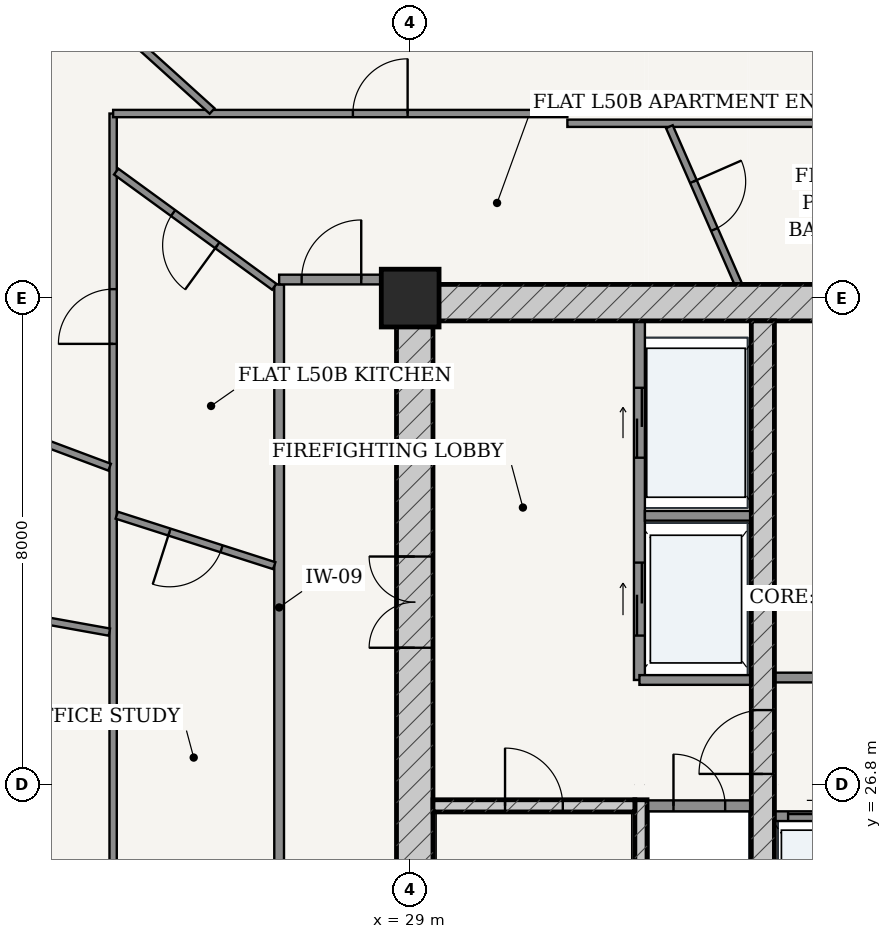
"""IFC4 building model, lengths in metres.
Left out: names, types, materials, properties, quantities, classifications, styles, units other than length and angle.
Written with IfcOpenShell. Run it as: python <this file> out.ifc"""

import sys

from ifc_helpers import new_model, si_unit, direction, frame, frame_2d, origin, origin_2d, place, context, subcontext, project, spatial, rectangle, extrude, source, transform, mapped, element, fill, save


model = new_model("IFC4")
c1 = context("Model", 3, precision=1e-05, world=origin(), true_north=direction((-0.2419218956, 0.970295726276)))
c2 = subcontext(c1, "Body", "Model", "MODEL_VIEW")
j1 = project(units=[si_unit("LENGTHUNIT", "METRE"), si_unit("PLANEANGLEUNIT", "RADIAN")], contexts=[c1])
p1 = place(None, origin())
s1 = spatial("IfcSite", under=j1, at=p1, CompositionType="ELEMENT")
p2 = place(p1, origin())
s2 = spatial("IfcBuilding", under=s1, at=p2, CompositionType="ELEMENT")
p3 = place(p2, frame((0.0, 0.0, 191.2)))
s3 = spatial("IfcBuildingStorey", under=s2, at=p3, CompositionType="ELEMENT", Elevation=191.2)
p4 = place(p3, frame((29.0, 34.8, 0.0), z_axis=(0.0, 0.0, 1.0), x_axis=(1.0, 0.0, 0.0)))
e1 = element("IfcColumn", 1, at=p4, inside=s3, PredefinedType="COLUMN", context=c2, shape_type="SweptSolid", body=[
    extrude(rectangle(XDim=0.95, YDim=0.95, at=origin_2d()), origin(), (0.0, 0.0, 1.0), 3.7),
])
p5 = place(p3, frame((28.775, 34.725, 0.0), z_axis=(0.0, 0.0, 1.0), x_axis=(1.0, 0.0, 0.0)))
e2 = element("IfcWall", 2, at=p5, inside=s3, PredefinedType="SHEAR", context=c2, shape_type="SweptSolid", body=[
    extrude(rectangle(XDim=18.45, YDim=0.6, at=frame_2d((9.225, 0.0))), origin(), (0.0, 0.0, 1.0), 3.435),
])
p6 = place(p3, frame((29.075, 19.175, 0.0), z_axis=(0.0, 0.0, 1.0), x_axis=(0.0, 1.0, 0.0)))
e3 = element("IfcWall", 3, at=p6, inside=s3, PredefinedType="SHEAR", context=c2, shape_type="SweptSolid", body=[
    extrude(rectangle(XDim=15.25, YDim=0.6, at=frame_2d((7.625, 0.0))), origin(), (0.0, 0.0, 1.0), 3.435),
])
p7 = place(p6, frame((9.875, 0.0, 0.0)))
e4 = element("IfcOpeningElement", 4, at=p7, cuts=e3, PredefinedType="OPENING", context=c2, shape_type="SweptSolid", body=[
    extrude(rectangle(XDim=1.5, YDim=2.2, at=frame_2d((0.75, 1.1))), frame((0.0, 0.31, 0.0), z_axis=(0.0, -1.0, 0.0), x_axis=(1.0, 0.0, 0.0)), (0.0, 0.0, 1.0), 0.62),
])
p8 = place(p3, frame((32.795, 19.175, 0.0), z_axis=(0.0, 0.0, 1.0), x_axis=(0.0, 1.0, 0.0)))
e5 = element("IfcWall", 5, at=p8, inside=s3, PredefinedType="SOLIDWALL", context=c2, shape_type="SweptSolid", body=[
    extrude(rectangle(XDim=7.375, YDim=0.2, at=frame_2d((3.688, 0.0))), origin(), (0.0, 0.0, 1.0), 3.435),
])
p9 = place(p3, frame((29.375, 26.45, 0.0), z_axis=(0.0, 0.0, 1.0), x_axis=(1.0, 0.0, 0.0)))
e6 = element("IfcWall", 6, at=p9, inside=s3, PredefinedType="SOLIDWALL", context=c2, shape_type="SweptSolid", body=[
    extrude(rectangle(XDim=3.32, YDim=0.2, at=frame_2d((1.66, 0.0))), origin(), (0.0, 0.0, 1.0), 3.435),
])
p10 = place(p9, frame((1.185, 0.0, 0.0)))
e7 = element("IfcOpeningElement", 7, at=p10, cuts=e6, PredefinedType="OPENING", context=c2, shape_type="SweptSolid", body=[
    extrude(rectangle(XDim=0.95, YDim=2.15, at=frame_2d((0.475, 1.075))), frame((0.0, 0.11, 0.0), z_axis=(0.0, -1.0, 0.0), x_axis=(1.0, 0.0, 0.0)), (0.0, 0.0, 1.0), 0.22),
])
p11 = place(p3, frame((34.8, 19.175, 0.0), z_axis=(0.0, 0.0, 1.0), x_axis=(0.0, 1.0, 0.0)))
e8 = element("IfcWall", 8, at=p11, inside=s3, PredefinedType="SHEAR", context=c2, shape_type="SweptSolid", body=[
    extrude(rectangle(XDim=15.25, YDim=0.38, at=frame_2d((7.625, 0.0))), origin(), (0.0, 0.0, 1.0), 3.435),
])
p12 = place(p11, frame((7.8, 0.0, 0.0)))
e9 = element("IfcOpeningElement", 9, at=p12, cuts=e8, PredefinedType="OPENING", context=c2, shape_type="SweptSolid", body=[
    extrude(rectangle(XDim=1.05, YDim=2.15, at=frame_2d((0.525, 1.075))), frame((0.0, 0.2, 0.0), z_axis=(0.0, -1.0, 0.0), x_axis=(1.0, 0.0, 0.0)), (0.0, 0.0, 1.0), 0.4),
])
p13 = place(p3, frame((32.9, 26.45, 0.0), z_axis=(0.0, 0.0, 1.0), x_axis=(1.0, 0.0, 0.0)))
e10 = element("IfcWall", 10, at=p13, inside=s3, PredefinedType="PARTITIONING", context=c2, shape_type="SweptSolid", body=[
    extrude(rectangle(XDim=1.71, YDim=0.18, at=frame_2d((0.855, 0.0))), origin(), (0.0, 0.0, 1.0), 3.435),
])
p14 = place(p13, frame((0.43, 0.0, 0.0)))
e11 = element("IfcOpeningElement", 11, at=p14, cuts=e10, PredefinedType="OPENING", context=c2, shape_type="SweptSolid", body=[
    extrude(rectangle(XDim=0.85, YDim=2.1, at=frame_2d((0.425, 1.05))), frame((0.0, 0.1, 0.0), z_axis=(0.0, -1.0, 0.0), x_axis=(1.0, 0.0, 0.0)), (0.0, 0.0, 1.0), 0.2),
])
p15 = place(p3, frame((32.77, 28.52, 0.0), z_axis=(0.0, 0.0, 1.0), x_axis=(0.0, 1.0, 0.0)))
e12 = element("IfcWall", 12, at=p15, inside=s3, PredefinedType="PARTITIONING", context=c2, shape_type="SweptSolid", body=[
    extrude(rectangle(XDim=5.905, YDim=0.18, at=frame_2d((2.953, 0.0))), origin(), (0.0, 0.0, 1.0), 3.435),
])
p16 = place(p15, frame((3.655, 0.0, 0.0)))
e13 = element("IfcOpeningElement", 13, at=p16, cuts=e12, PredefinedType="OPENING", context=c2, shape_type="SweptSolid", body=[
    extrude(rectangle(XDim=1.15, YDim=2.2, at=frame_2d((0.575, 1.1))), frame((0.0, 0.1, 0.0), z_axis=(0.0, -1.0, 0.0), x_axis=(1.0, 0.0, 0.0)), (0.0, 0.0, 1.0), 0.2),
])
p17 = place(p15, frame((0.73, 0.0, 0.0)))
e14 = element("IfcOpeningElement", 14, at=p17, cuts=e12, PredefinedType="OPENING", context=c2, shape_type="SweptSolid", body=[
    extrude(rectangle(XDim=1.2, YDim=2.25, at=frame_2d((0.6, 1.125))), frame((0.0, 0.1, 0.0), z_axis=(0.0, -1.0, 0.0), x_axis=(1.0, 0.0, 0.0)), (0.0, 0.0, 1.0), 0.2),
])
p18 = place(p3, frame((32.86, 31.22, 0.0), z_axis=(0.0, 0.0, 1.0), x_axis=(1.0, 0.0, 0.0)))
e15 = element("IfcWall", 15, at=p18, inside=s3, PredefinedType="PARTITIONING", context=c2, shape_type="SweptSolid", body=[
    extrude(rectangle(XDim=1.75, YDim=0.16, at=frame_2d((0.875, 0.0))), origin(), (0.0, 0.0, 1.0), 3.435),
])
p19 = place(p3, frame((32.77, 28.52, 0.0), z_axis=(0.0, 0.0, 1.0), x_axis=(1.0, 0.0, 0.0)))
e16 = element("IfcWall", 16, at=p19, inside=s3, PredefinedType="PARTITIONING", context=c2, shape_type="SweptSolid", body=[
    extrude(rectangle(XDim=1.84, YDim=0.16, at=frame_2d((0.92, 0.0))), origin(), (0.0, 0.0, 1.0), 3.435),
])
p20 = place(p3, frame((34.99, 28.56, 0.0), z_axis=(0.0, 0.0, 1.0), x_axis=(1.0, 0.0, 0.0)))
e17 = element("IfcWall", 17, at=p20, inside=s3, PredefinedType="PARTITIONING", context=c2, shape_type="SweptSolid", body=[
    extrude(rectangle(XDim=6.02, YDim=0.16, at=frame_2d((3.01, 0.0))), origin(), (0.0, 0.0, 1.0), 3.435),
])
p21 = place(p20, frame((2.585, 0.0, 0.0)))
e18 = element("IfcOpeningElement", 18, at=p21, cuts=e17, PredefinedType="OPENING", context=c2, shape_type="SweptSolid", body=[
    extrude(rectangle(XDim=0.85, YDim=2.1, at=frame_2d((0.425, 1.05))), frame((0.0, 0.09, 0.0), z_axis=(0.0, -1.0, 0.0), x_axis=(1.0, 0.0, 0.0)), (0.0, 0.0, 1.0), 0.18),
])
p22 = place(p3, frame((34.99, 26.28, 0.0), z_axis=(0.0, 0.0, 1.0), x_axis=(1.0, 0.0, 0.0)))
e19 = element("IfcWall", 19, at=p22, inside=s3, PredefinedType="PARTITIONING", context=c2, shape_type="SweptSolid", body=[
    extrude(rectangle(XDim=6.02, YDim=0.16, at=frame_2d((3.01, 0.0))), origin(), (0.0, 0.0, 1.0), 3.435),
])
p23 = place(p22, frame((0.225, 0.0, 0.0)))
e20 = element("IfcOpeningElement", 20, at=p23, cuts=e19, PredefinedType="OPENING", context=c2, shape_type="SweptSolid", body=[
    extrude(rectangle(XDim=1.1, YDim=2.2, at=frame_2d((0.55, 1.1))), frame((0.0, 0.09, 0.0), z_axis=(0.0, -1.0, 0.0), x_axis=(1.0, 0.0, 0.0)), (0.0, 0.0, 1.0), 0.18),
])
p24 = place(p22, frame((1.705, 0.0, 0.0)))
e21 = element("IfcOpeningElement", 21, at=p24, cuts=e19, PredefinedType="OPENING", context=c2, shape_type="SweptSolid", body=[
    extrude(rectangle(XDim=1.1, YDim=2.2, at=frame_2d((0.55, 1.1))), frame((0.0, 0.09, 0.0), z_axis=(0.0, -1.0, 0.0), x_axis=(1.0, 0.0, 0.0)), (0.0, 0.0, 1.0), 0.18),
])
p25 = place(p3, frame((26.845, 24.4, 0.0), z_axis=(0.0, 0.0, 1.0), x_axis=(0.0, 1.0, 0.0)))
e22 = element("IfcWall", 22, at=p25, inside=s3, PredefinedType="PARTITIONING", context=c2, shape_type="SweptSolid", body=[
    extrude(rectangle(XDim=10.625, YDim=0.16, at=frame_2d((5.312, 0.0))), origin(), (0.0, 0.0, 1.0), 2.951),
])
p26 = place(p3, frame((26.845, 35.105, 0.0), z_axis=(0.0, 0.0, 1.0), x_axis=(1.0, 0.0, 0.0)))
e23 = element("IfcWall", 23, at=p26, inside=s3, PredefinedType="PARTITIONING", context=c2, shape_type="SweptSolid", body=[
    extrude(rectangle(XDim=1.93, YDim=0.16, at=frame_2d((0.965, 0.0))), origin(), (0.0, 0.0, 1.0), 3.435),
])
p27 = place(p26, frame((0.37, 0.0, 0.0)))
e24 = element("IfcOpeningElement", 24, at=p27, cuts=e23, PredefinedType="OPENING", context=c2, shape_type="SweptSolid", body=[
    extrude(rectangle(XDim=0.98, YDim=2.2, at=frame_2d((0.49, 1.1))), frame((0.0, 0.09, 0.0), z_axis=(0.0, -1.0, 0.0), x_axis=(1.0, 0.0, 0.0)), (0.0, 0.0, 1.0), 0.18),
])
p28 = place(p3, frame((24.115, 24.406, 0.0), z_axis=(0.0, 0.0, 1.0), x_axis=(0.0, 1.0, 0.0)))
e25 = element("IfcWall", 25, at=p28, inside=s3, PredefinedType="PARTITIONING", context=c2, shape_type="SweptSolid", body=[
    extrude(rectangle(XDim=13.429, YDim=0.12, at=frame_2d((6.714, 0.0))), origin(), (0.0, 0.0, 1.0), 2.951),
])
p29 = place(p28, frame((9.641, 0.0, 0.0)))
e26 = element("IfcOpeningElement", 26, at=p29, cuts=e25, PredefinedType="OPENING", context=c2, shape_type="SweptSolid", body=[
    extrude(rectangle(XDim=0.9, YDim=2.15, at=frame_2d((0.45, 1.075))), frame((0.0, 0.07, 0.0), z_axis=(0.0, -1.0, 0.0), x_axis=(1.0, 0.0, 0.0)), (0.0, 0.0, 1.0), 0.14),
])
p30 = place(p3, frame((24.115, 37.835, 0.0), z_axis=(0.0, 0.0, 1.0), x_axis=(1.0, 0.0, 0.0)))
e27 = element("IfcWall", 27, at=p30, inside=s3, PredefinedType="PARTITIONING", context=c2, shape_type="SweptSolid", body=[
    extrude(rectangle(XDim=7.47, YDim=0.12, at=frame_2d((3.735, 0.0))), origin(), (0.0, 0.0, 1.0), 2.951),
])
p31 = place(p30, frame((3.943, 0.0, 0.0)))
e28 = element("IfcOpeningElement", 28, at=p31, cuts=e27, PredefinedType="OPENING", context=c2, shape_type="SweptSolid", body=[
    extrude(rectangle(XDim=0.9, YDim=2.15, at=frame_2d((0.45, 1.075))), frame((0.0, 0.07, 0.0), z_axis=(0.0, -1.0, 0.0), x_axis=(1.0, 0.0, 0.0)), (0.0, 0.0, 1.0), 0.14),
])
p32 = place(p3, frame((31.585, 37.675, 0.0), z_axis=(0.0, 0.0, 1.0), x_axis=(1.0, 0.0, 0.0)))
e29 = element("IfcWall", 29, at=p32, inside=s3, PredefinedType="PARTITIONING", context=c2, shape_type="SweptSolid", body=[
    extrude(rectangle(XDim=6.313, YDim=0.12, at=frame_2d((3.156, 0.0))), origin(), (0.0, 0.0, 1.0), 2.951),
])
p33 = place(p3, frame((25.743, 37.876, 0.0), z_axis=(0.0, 0.0, 1.0), x_axis=(-0.741943837234, 0.670462036502, 0.0)))
e30 = element("IfcWall", 30, at=p33, inside=s3, PredefinedType="PARTITIONING", context=c2, shape_type="SweptSolid", body=[
    extrude(rectangle(XDim=4.194, YDim=0.12, at=frame_2d((2.097, 0.0))), origin(), (0.0, 0.0, 1.0), 2.951),
])
p34 = place(p3, frame((24.057, 32.019, 0.0), z_axis=(0.0, 0.0, 1.0), x_axis=(-0.936540194592, 0.350560214389, 0.0)))
e31 = element("IfcWall", 31, at=p34, inside=s3, PredefinedType="PARTITIONING", context=c2, shape_type="SweptSolid", body=[
    extrude(rectangle(XDim=6.556, YDim=0.12, at=frame_2d((3.278, 0.0))), origin(), (0.0, 0.0, 1.0), 2.951),
])
p35 = place(p34, frame((2.828, 0.0, 0.0)))
e32 = element("IfcOpeningElement", 32, at=p35, cuts=e31, PredefinedType="OPENING", context=c2, shape_type="SweptSolid", body=[
    extrude(rectangle(XDim=0.9, YDim=2.15, at=frame_2d((0.45, 1.075))), frame((0.0, 0.07, 0.0), z_axis=(0.0, -1.0, 0.0), x_axis=(1.0, 0.0, 0.0)), (0.0, 0.0, 1.0), 0.14),
])
p36 = place(p3, frame((24.054, 29.307, 0.0), z_axis=(0.0, 0.0, 1.0), x_axis=(-0.984227185588, 0.176909149424, 0.0)))
e33 = element("IfcWall", 33, at=p36, inside=s3, PredefinedType="PARTITIONING", context=c2, shape_type="SweptSolid", body=[
    extrude(rectangle(XDim=7.448, YDim=0.12, at=frame_2d((3.724, 0.0))), origin(), (0.0, 0.0, 1.0), 2.951),
])
p37 = place(p36, frame((2.264, 0.0, 0.0)))
e34 = element("IfcOpeningElement", 34, at=p37, cuts=e33, PredefinedType="OPENING", context=c2, shape_type="SweptSolid", body=[
    extrude(rectangle(XDim=0.9, YDim=2.15, at=frame_2d((0.45, 1.075))), frame((0.0, 0.07, 0.0), z_axis=(0.0, -1.0, 0.0), x_axis=(1.0, 0.0, 0.0)), (0.0, 0.0, 1.0), 0.14),
])
p38 = place(p3, frame((34.397, 35.027, 0.0), z_axis=(0.0, 0.0, 1.0), x_axis=(-0.401135725485, 0.916018629581, 0.0)))
e35 = element("IfcWall", 35, at=p38, inside=s3, PredefinedType="PARTITIONING", context=c2, shape_type="SweptSolid", body=[
    extrude(rectangle(XDim=2.829, YDim=0.12, at=frame_2d((1.415, 0.0))), origin(), (0.0, 0.0, 1.0), 3.435),
])
p39 = place(p38, frame((0.985, 0.0, 0.0)))
e36 = element("IfcOpeningElement", 36, at=p39, cuts=e35, PredefinedType="OPENING", context=c2, shape_type="SweptSolid", body=[
    extrude(rectangle(XDim=0.86, YDim=2.15, at=frame_2d((0.43, 1.075))), frame((0.0, 0.07, 0.0), z_axis=(0.0, -1.0, 0.0), x_axis=(1.0, 0.0, 0.0)), (0.0, 0.0, 1.0), 0.14),
])
p40 = place(p3, frame((26.765, 34.986, 0.0), z_axis=(0.0, 0.0, 1.0), x_axis=(-0.808220499107, 0.588879974887, 0.0)))
e37 = element("IfcWall", 37, at=p40, inside=s3, PredefinedType="PARTITIONING", context=c2, shape_type="SweptSolid", body=[
    extrude(rectangle(XDim=3.217, YDim=0.12, at=frame_2d((1.608, 0.0))), origin(), (0.0, 0.0, 1.0), 3.11),
])
p41 = place(p40, frame((1.158, 0.0, 0.0)))
e38 = element("IfcOpeningElement", 38, at=p41, cuts=e37, PredefinedType="OPENING", context=c2, shape_type="SweptSolid", body=[
    extrude(rectangle(XDim=0.9, YDim=2.15, at=frame_2d((0.45, 1.075))), frame((0.0, 0.07, 0.0), z_axis=(0.0, -1.0, 0.0), x_axis=(1.0, 0.0, 0.0)), (0.0, 0.0, 1.0), 0.14),
])
p42 = place(p3, frame((26.765, 30.4, 0.0), z_axis=(0.0, 0.0, 1.0), x_axis=(-0.952315722301, 0.305114347514, 0.0)))
e39 = element("IfcWall", 39, at=p42, inside=s3, PredefinedType="PARTITIONING", context=c2, shape_type="SweptSolid", body=[
    extrude(rectangle(XDim=2.72, YDim=0.12, at=frame_2d((1.36, 0.0))), origin(), (0.0, 0.0, 1.0), 3.435),
])
p43 = place(p42, frame((0.91, 0.0, 0.0)))
e40 = element("IfcOpeningElement", 40, at=p43, cuts=e39, PredefinedType="OPENING", context=c2, shape_type="SweptSolid", body=[
    extrude(rectangle(XDim=0.9, YDim=2.15, at=frame_2d((0.45, 1.075))), frame((0.0, 0.07, 0.0), z_axis=(0.0, -1.0, 0.0), x_axis=(1.0, 0.0, 0.0)), (0.0, 0.0, 1.0), 0.14),
])
m1 = source(origin(), c2, "Body", "SweptSolid", [
    extrude(rectangle(XDim=1.5, YDim=2.2, at=frame_2d((0.75, 1.1))), frame((0.0, 0.025, 0.0), z_axis=(0.0, -1.0, 0.0), x_axis=(1.0, 0.0, 0.0)), (0.0, 0.0, 1.0), 0.05),
])
p44 = place(p7, origin())
e41 = element("IfcDoor", 41, at=p44, inside=s3, OperationType="DOUBLE_DOOR_SINGLE_SWING", PredefinedType="DOOR", context=c2, shape_type="MappedRepresentation", body=[
    mapped(m1, transform((0.0, 0.0, 0.0), scale=1.0)),
])
fill(e4, e41)
m2 = source(origin(), c2, "Body", "SweptSolid", [
    extrude(rectangle(XDim=1.05, YDim=2.15, at=frame_2d((0.525, 1.075))), frame((0.0, 0.025, 0.0), z_axis=(0.0, -1.0, 0.0), x_axis=(1.0, 0.0, 0.0)), (0.0, 0.0, 1.0), 0.05),
])
p45 = place(p12, origin())
e42 = element("IfcDoor", 42, at=p45, inside=s3, OperationType="SINGLE_SWING_LEFT", PredefinedType="DOOR", context=c2, shape_type="MappedRepresentation", body=[
    mapped(m2, transform((0.0, 0.0, 0.0), scale=1.0)),
])
fill(e9, e42)
m3 = source(origin(), c2, "Body", "SweptSolid", [
    extrude(rectangle(XDim=0.95, YDim=2.15, at=frame_2d((0.475, 1.075))), frame((0.0, 0.025, 0.0), z_axis=(0.0, -1.0, 0.0), x_axis=(1.0, 0.0, 0.0)), (0.0, 0.0, 1.0), 0.05),
])
p46 = place(p10, origin())
e43 = element("IfcDoor", 43, at=p46, inside=s3, OperationType="SINGLE_SWING_LEFT", PredefinedType="DOOR", context=c2, shape_type="MappedRepresentation", body=[
    mapped(m3, transform((0.0, 0.0, 0.0), scale=1.0)),
])
fill(e7, e43)
m4 = source(origin(), c2, "Body", "SweptSolid", [
    extrude(rectangle(XDim=0.85, YDim=2.1, at=frame_2d((0.425, 1.05))), frame((0.0, 0.025, 0.0), z_axis=(0.0, -1.0, 0.0), x_axis=(1.0, 0.0, 0.0)), (0.0, 0.0, 1.0), 0.05),
])
p47 = place(p14, origin())
e44 = element("IfcDoor", 44, at=p47, inside=s3, OperationType="SINGLE_SWING_LEFT", PredefinedType="DOOR", context=c2, shape_type="MappedRepresentation", body=[
    mapped(m4, transform((0.0, 0.0, 0.0), scale=1.0)),
])
fill(e11, e44)
m5 = source(origin(), c2, "Body", "SweptSolid", [
    extrude(rectangle(XDim=1.15, YDim=2.2, at=frame_2d((0.575, 1.1))), frame((0.0, 0.025, 0.0), z_axis=(0.0, -1.0, 0.0), x_axis=(1.0, 0.0, 0.0)), (0.0, 0.0, 1.0), 0.05),
])
p48 = place(p16, origin())
e45 = element("IfcDoor", 45, at=p48, inside=s3, OperationType="DOUBLE_DOOR_SLIDING", PredefinedType="DOOR", context=c2, shape_type="MappedRepresentation", body=[
    mapped(m5, transform((0.0, 0.0, 0.0), scale=1.0)),
])
fill(e13, e45)
m6 = source(origin(), c2, "Body", "SweptSolid", [
    extrude(rectangle(XDim=1.2, YDim=2.25, at=frame_2d((0.6, 1.125))), frame((0.0, 0.025, 0.0), z_axis=(0.0, -1.0, 0.0), x_axis=(1.0, 0.0, 0.0)), (0.0, 0.0, 1.0), 0.05),
])
p49 = place(p17, origin())
e46 = element("IfcDoor", 46, at=p49, inside=s3, OperationType="DOUBLE_DOOR_SLIDING", PredefinedType="DOOR", context=c2, shape_type="MappedRepresentation", body=[
    mapped(m6, transform((0.0, 0.0, 0.0), scale=1.0)),
])
fill(e14, e46)
m7 = source(origin(), c2, "Body", "SweptSolid", [
    extrude(rectangle(XDim=1.1, YDim=2.2, at=frame_2d((0.55, 1.1))), frame((0.0, 0.025, 0.0), z_axis=(0.0, -1.0, 0.0), x_axis=(1.0, 0.0, 0.0)), (0.0, 0.0, 1.0), 0.05),
])
p50 = place(p23, origin())
e47 = element("IfcDoor", 47, at=p50, inside=s3, OperationType="DOUBLE_DOOR_SLIDING", PredefinedType="DOOR", context=c2, shape_type="MappedRepresentation", body=[
    mapped(m7, transform((0.0, 0.0, 0.0), scale=1.0)),
])
fill(e20, e47)
m8 = source(origin(), c2, "Body", "SweptSolid", [
    extrude(rectangle(XDim=0.98, YDim=2.2, at=frame_2d((0.49, 1.1))), frame((0.0, 0.025, 0.0), z_axis=(0.0, -1.0, 0.0), x_axis=(1.0, 0.0, 0.0)), (0.0, 0.0, 1.0), 0.05),
])
p51 = place(p27, origin())
e48 = element("IfcDoor", 48, at=p51, inside=s3, OperationType="SINGLE_SWING_RIGHT", PredefinedType="DOOR", context=c2, shape_type="MappedRepresentation", body=[
    mapped(m8, transform((0.0, 0.0, 0.0), scale=1.0)),
])
fill(e24, e48)
m9 = source(origin(), c2, "Body", "SweptSolid", [
    extrude(rectangle(XDim=0.86, YDim=2.15, at=frame_2d((0.43, 1.075))), frame((0.0, 0.025, 0.0), z_axis=(0.0, -1.0, 0.0), x_axis=(1.0, 0.0, 0.0)), (0.0, 0.0, 1.0), 0.05),
])
p52 = place(p39, frame((0.86, 0.0, 0.0), z_axis=(0.0, 0.0, 1.0), x_axis=(-1.0, 0.0, 0.0)))
e49 = element("IfcDoor", 49, at=p52, inside=s3, OperationType="SINGLE_SWING_LEFT", PredefinedType="DOOR", context=c2, shape_type="MappedRepresentation", body=[
    mapped(m9, transform((0.0, 0.0, 0.0), scale=1.0)),
])
fill(e36, e49)
m10 = source(origin(), c2, "Body", "SweptSolid", [
    extrude(rectangle(XDim=0.9, YDim=2.15, at=frame_2d((0.45, 1.075))), frame((0.0, 0.025, 0.0), z_axis=(0.0, -1.0, 0.0), x_axis=(1.0, 0.0, 0.0)), (0.0, 0.0, 1.0), 0.05),
])
p53 = place(p31, origin())
e50 = element("IfcDoor", 50, at=p53, inside=s3, OperationType="SINGLE_SWING_RIGHT", PredefinedType="DOOR", context=c2, shape_type="MappedRepresentation", body=[
    mapped(m10, transform((0.0, 0.0, 0.0), scale=1.0)),
])
fill(e28, e50)
p54 = place(p41, origin())
e51 = element("IfcDoor", 51, at=p54, inside=s3, OperationType="SINGLE_SWING_LEFT", PredefinedType="DOOR", context=c2, shape_type="MappedRepresentation", body=[
    mapped(m10, transform((0.0, 0.0, 0.0), scale=1.0)),
])
fill(e38, e51)
p55 = place(p43, origin())
e52 = element("IfcDoor", 52, at=p55, inside=s3, OperationType="SINGLE_SWING_RIGHT", PredefinedType="DOOR", context=c2, shape_type="MappedRepresentation", body=[
    mapped(m10, transform((0.0, 0.0, 0.0), scale=1.0)),
])
fill(e40, e52)
p56 = place(p29, origin())
e53 = element("IfcDoor", 53, at=p56, inside=s3, OperationType="SINGLE_SWING_LEFT", PredefinedType="DOOR", context=c2, shape_type="MappedRepresentation", body=[
    mapped(m10, transform((0.0, 0.0, 0.0), scale=1.0)),
])
fill(e26, e53)
save(model, sys.argv[1])
